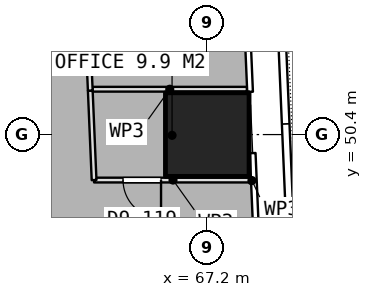
"""IFC4 building model, lengths in metres.
Left out: names, types, materials, properties, quantities, classifications, styles, units other than length and angle.
Written with IfcOpenShell. Run it as: python <this file> out.ifc"""

import sys

from ifc_helpers import new_model, si_unit, direction, frame, frame_2d, origin, origin_2d, place, context, subcontext, project, spatial, rectangle, extrude, element, fill, save


model = new_model("IFC4")
c1 = context("Model", 3, precision=1e-05, world=origin(), true_north=direction((0.0, 1.0)))
c2 = subcontext(c1, "Body", "Model", "MODEL_VIEW")
j1 = project(units=[si_unit("LENGTHUNIT", "METRE"), si_unit("PLANEANGLEUNIT", "RADIAN")], contexts=[c1])
p1 = place(None, origin())
s1 = spatial("IfcSite", under=j1, at=p1, CompositionType="ELEMENT")
p2 = place(p1, origin())
s2 = spatial("IfcBuilding", under=s1, at=p2, CompositionType="ELEMENT")
p3 = place(p2, frame((0.0, 0.0, 44.15)))
s3 = spatial("IfcBuildingStorey", under=s2, at=p3, CompositionType="ELEMENT", Elevation=44.15)
p4 = place(p3, frame((67.2, 50.4, 0.0), z_axis=(0.0, 0.0, 1.0), x_axis=(1.0, 0.0, 0.0)))
e1 = element("IfcColumn", 1, at=p4, inside=s3, PredefinedType="COLUMN", context=c2, shape_type="SweptSolid", body=[
    extrude(rectangle(XDim=2.2, YDim=2.2, at=origin_2d()), origin(), (0.0, 0.0, 1.0), 3.75),
])
p5 = place(p3, frame((68.376, 49.203, 0.0), z_axis=(0.0, 0.0, 1.0), x_axis=(-1.0, 0.0, 0.0)))
e2 = element("IfcWall", 2, at=p5, inside=s3, PredefinedType="PARTITIONING", context=c2, shape_type="SweptSolid", body=[
    extrude(rectangle(XDim=4.154, YDim=0.125, at=frame_2d((2.077, 0.0))), origin(), (0.0, 0.0, 1.0), 3.5),
])
p6 = place(p5, frame((2.392, 0.0, 0.0)))
e3 = element("IfcOpeningElement", 3, at=p6, cuts=e2, PredefinedType="OPENING", context=c2, shape_type="SweptSolid", body=[
    extrude(rectangle(XDim=1.0, YDim=2.1, at=frame_2d((0.5, 1.05))), frame((0.0, 0.073, 0.0), z_axis=(0.0, -1.0, 0.0), x_axis=(1.0, 0.0, 0.0)), (0.0, 0.0, 1.0), 0.145),
])
p7 = place(p3, frame((64.222, 49.203, 0.0), z_axis=(0.0, 0.0, 1.0), x_axis=(-0.042398031424, 0.999100799185, 0.0)))
e4 = element("IfcWall", 4, at=p7, inside=s3, PredefinedType="PARTITIONING", context=c2, shape_type="SweptSolid", body=[
    extrude(rectangle(XDim=2.355, YDim=0.125, at=frame_2d((1.178, 0.0))), origin(), (0.0, 0.0, 1.0), 3.5),
])
p8 = place(p3, frame((64.183, 51.593, 0.0), z_axis=(0.0, 0.0, 1.0), x_axis=(1.0, 0.0, 0.0)))
e5 = element("IfcWall", 5, at=p8, inside=s3, PredefinedType="PARTITIONING", context=c2, shape_type="SweptSolid", body=[
    extrude(rectangle(XDim=4.061, YDim=0.125, at=frame_2d((2.03, 0.0))), origin(), (0.0, 0.0, 1.0), 3.5),
])
p9 = place(p3, frame((64.122, 51.557, 0.0), z_axis=(0.0, 0.0, 1.0), x_axis=(-0.042655733352, 0.999089830001, 0.0)))
e6 = element("IfcWall", 6, at=p9, inside=s3, PredefinedType="PARTITIONING", context=c2, shape_type="SweptSolid", body=[
    extrude(rectangle(XDim=4.854, YDim=0.125, at=frame_2d((2.427, 0.0))), origin(), (0.0, 0.0, 1.0), 3.5),
])
p10 = place(p3, frame((68.376, 49.266, 0.0), z_axis=(0.0, 0.0, 1.0), x_axis=(0.0, -1.0, 0.0)))
e7 = element("IfcWall", 7, at=p10, inside=s3, PredefinedType="PARTITIONING", context=c2, shape_type="SweptSolid", body=[
    extrude(rectangle(XDim=0.151, YDim=0.125, at=frame_2d((0.076, 0.0))), origin(), (0.0, 0.0, 1.0), 3.5),
])
p11 = place(p6, origin())
e8 = element("IfcDoor", 8, at=p11, inside=s3, OperationType="SINGLE_SWING_LEFT", PredefinedType="DOOR", context=c2, shape_type="SweptSolid", body=[
    extrude(rectangle(XDim=1.0, YDim=2.1, at=frame_2d((0.5, 1.05))), frame((0.0, 0.025, 0.0), z_axis=(0.0, -1.0, 0.0), x_axis=(1.0, 0.0, 0.0)), (0.0, 0.0, 1.0), 0.05),
])
fill(e3, e8)
save(model, sys.argv[1])
